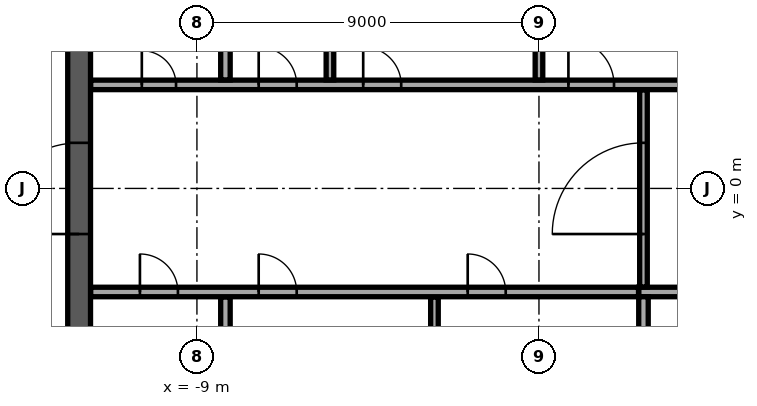
"""IFC4 building model, lengths in metres.
Left out: names, types, materials, properties, quantities, classifications, styles, units other than length and angle.
Written with IfcOpenShell. Run it as: python <this file> out.ifc"""

import sys

from ifc_helpers import new_model, si_unit, direction, frame, frame_2d, origin, place, context, subcontext, project, spatial, rectangle, extrude, element, fill, save


model = new_model("IFC4")
c1 = context("Model", 3, precision=1e-05, world=origin(), true_north=direction((0.0, 1.0)))
c2 = subcontext(c1, "Body", "Model", "MODEL_VIEW")
j1 = project(units=[si_unit("LENGTHUNIT", "METRE"), si_unit("PLANEANGLEUNIT", "RADIAN")], contexts=[c1])
p1 = place(None, origin())
s1 = spatial("IfcSite", under=j1, at=p1, CompositionType="ELEMENT")
p2 = place(p1, origin())
s2 = spatial("IfcBuilding", under=s1, at=p2, CompositionType="ELEMENT")
p3 = place(p2, frame((0.0, 0.0, 316.5)))
s3 = spatial("IfcBuildingStorey", under=s2, at=p3, CompositionType="ELEMENT", Elevation=316.5)
p4 = place(p3, frame((-12.1, -11.8, 0.0), z_axis=(0.0, 0.0, 1.0), x_axis=(0.0, 1.0, 0.0)))
e1 = element("IfcWall", 1, at=p4, inside=s3, PredefinedType="SHEAR", context=c2, shape_type="SweptSolid", body=[
    extrude(rectangle(XDim=23.6, YDim=0.6, at=frame_2d((11.8, 0.0))), origin(), (0.0, 0.0, 1.0), 3.65),
])
p5 = place(p4, frame((10.6, 0.0, 0.0)))
e2 = element("IfcOpeningElement", 2, at=p5, cuts=e1, PredefinedType="OPENING", context=c2, shape_type="SweptSolid", body=[
    extrude(rectangle(XDim=2.4, YDim=2.4, at=frame_2d((1.2, 1.2))), frame((0.0, 0.31, 0.0), z_axis=(0.0, -1.0, 0.0), x_axis=(1.0, 0.0, 0.0)), (0.0, 0.0, 1.0), 0.62),
])
p6 = place(p3, frame((2.625, -2.725, 0.0), z_axis=(0.0, 0.0, 1.0), x_axis=(1.0, 0.0, 0.0)))
e3 = element("IfcWall", 3, at=p6, inside=s3, PredefinedType="SOLIDWALL", context=c2, shape_type="SweptSolid", body=[
    extrude(rectangle(XDim=3.0, YDim=0.25, at=frame_2d((1.5, 0.0))), origin(), (0.0, 0.0, 1.0), 3.65),
])
p7 = place(p3, frame((2.75, -5.55, 0.0), z_axis=(0.0, 0.0, 1.0), x_axis=(0.0, 1.0, 0.0)))
e4 = element("IfcWall", 4, at=p7, inside=s3, PredefinedType="SOLIDWALL", context=c2, shape_type="SweptSolid", body=[
    extrude(rectangle(XDim=2.7, YDim=0.25, at=frame_2d((1.35, 0.0))), origin(), (0.0, 0.0, 1.0), 3.65),
])
p8 = place(p3, frame((-8.25, -5.545, 0.0), z_axis=(0.0, 0.0, 1.0), x_axis=(0.0, 1.0, 0.0)))
e5 = element("IfcWall", 5, at=p8, inside=s3, PredefinedType="PARTITIONING", context=c2, shape_type="SweptSolid", body=[
    extrude(rectangle(XDim=2.69, YDim=0.25, at=frame_2d((1.345, 0.0))), origin(), (0.0, 0.0, 1.0), 3.65),
])
p9 = place(p3, frame((-2.75, -5.545, 0.0), z_axis=(0.0, 0.0, 1.0), x_axis=(0.0, 1.0, 0.0)))
e6 = element("IfcWall", 6, at=p9, inside=s3, PredefinedType="PARTITIONING", context=c2, shape_type="SweptSolid", body=[
    extrude(rectangle(XDim=2.69, YDim=0.2, at=frame_2d((1.345, 0.0))), origin(), (0.0, 0.0, 1.0), 3.65),
])
p10 = place(p3, frame((-11.795, -2.725, 0.0), z_axis=(0.0, 0.0, 1.0), x_axis=(1.0, 0.0, 0.0)))
e7 = element("IfcWall", 7, at=p10, inside=s3, PredefinedType="PARTITIONING", context=c2, shape_type="SweptSolid", body=[
    extrude(rectangle(XDim=14.415, YDim=0.25, at=frame_2d((7.208, 0.0))), origin(), (0.0, 0.0, 1.0), 3.65),
])
p11 = place(p10, frame((1.295, 0.0, 0.0)))
e8 = element("IfcOpeningElement", 8, at=p11, cuts=e7, PredefinedType="OPENING", context=c2, shape_type="SweptSolid", body=[
    extrude(rectangle(XDim=1.0, YDim=2.1, at=frame_2d((0.5, 1.05))), frame((0.0, 0.135, 0.0), z_axis=(0.0, -1.0, 0.0), x_axis=(1.0, 0.0, 0.0)), (0.0, 0.0, 1.0), 0.27),
])
p12 = place(p10, frame((4.42, 0.0, 0.0)))
e9 = element("IfcOpeningElement", 9, at=p12, cuts=e7, PredefinedType="OPENING", context=c2, shape_type="SweptSolid", body=[
    extrude(rectangle(XDim=1.0, YDim=2.1, at=frame_2d((0.5, 1.05))), frame((0.0, 0.135, 0.0), z_axis=(0.0, -1.0, 0.0), x_axis=(1.0, 0.0, 0.0)), (0.0, 0.0, 1.0), 0.27),
])
p13 = place(p10, frame((9.92, 0.0, 0.0)))
e10 = element("IfcOpeningElement", 10, at=p13, cuts=e7, PredefinedType="OPENING", context=c2, shape_type="SweptSolid", body=[
    extrude(rectangle(XDim=1.0, YDim=2.1, at=frame_2d((0.5, 1.05))), frame((0.0, 0.135, 0.0), z_axis=(0.0, -1.0, 0.0), x_axis=(1.0, 0.0, 0.0)), (0.0, 0.0, 1.0), 0.27),
])
p14 = place(p3, frame((2.75, -2.595, 0.0), z_axis=(0.0, 0.0, 1.0), x_axis=(0.0, 1.0, 0.0)))
e11 = element("IfcWall", 11, at=p14, inside=s3, PredefinedType="PARTITIONING", context=c2, shape_type="SweptSolid", body=[
    extrude(rectangle(XDim=5.19, YDim=0.2, at=frame_2d((2.595, 0.0))), origin(), (0.0, 0.0, 1.0), 3.65),
])
p15 = place(p14, frame((1.395, 0.0, 0.0)))
e12 = element("IfcOpeningElement", 12, at=p15, cuts=e11, PredefinedType="OPENING", context=c2, shape_type="SweptSolid", body=[
    extrude(rectangle(XDim=2.4, YDim=2.4, at=frame_2d((1.2, 1.2))), frame((0.0, 0.11, 0.0), z_axis=(0.0, -1.0, 0.0), x_axis=(1.0, 0.0, 0.0)), (0.0, 0.0, 1.0), 0.22),
])
p16 = place(p3, frame((-11.795, 2.725, 0.0), z_axis=(0.0, 0.0, 1.0), x_axis=(1.0, 0.0, 0.0)))
e13 = element("IfcWall", 13, at=p16, inside=s3, PredefinedType="PARTITIONING", context=c2, shape_type="SweptSolid", body=[
    extrude(rectangle(XDim=23.59, YDim=0.25, at=frame_2d((11.795, 0.0))), origin(), (0.0, 0.0, 1.0), 3.65),
])
p17 = place(p16, frame((21.345, 0.0, 0.0)))
e14 = element("IfcOpeningElement", 14, at=p17, cuts=e13, PredefinedType="OPENING", context=c2, shape_type="SweptSolid", body=[
    extrude(rectangle(XDim=0.9, YDim=2.1, at=frame_2d((0.45, 1.05))), frame((0.0, 0.135, 0.0), z_axis=(0.0, -1.0, 0.0), x_axis=(1.0, 0.0, 0.0)), (0.0, 0.0, 1.0), 0.27),
])
p18 = place(p16, frame((1.345, 0.0, 0.0)))
e15 = element("IfcOpeningElement", 15, at=p18, cuts=e13, PredefinedType="OPENING", context=c2, shape_type="SweptSolid", body=[
    extrude(rectangle(XDim=0.9, YDim=2.1, at=frame_2d((0.45, 1.05))), frame((0.0, 0.135, 0.0), z_axis=(0.0, -1.0, 0.0), x_axis=(1.0, 0.0, 0.0)), (0.0, 0.0, 1.0), 0.27),
])
p19 = place(p16, frame((4.42, 0.0, 0.0)))
e16 = element("IfcOpeningElement", 16, at=p19, cuts=e13, PredefinedType="OPENING", context=c2, shape_type="SweptSolid", body=[
    extrude(rectangle(XDim=1.0, YDim=2.1, at=frame_2d((0.5, 1.05))), frame((0.0, 0.135, 0.0), z_axis=(0.0, -1.0, 0.0), x_axis=(1.0, 0.0, 0.0)), (0.0, 0.0, 1.0), 0.27),
])
p20 = place(p16, frame((7.17, 0.0, 0.0)))
e17 = element("IfcOpeningElement", 17, at=p20, cuts=e13, PredefinedType="OPENING", context=c2, shape_type="SweptSolid", body=[
    extrude(rectangle(XDim=1.0, YDim=2.1, at=frame_2d((0.5, 1.05))), frame((0.0, 0.135, 0.0), z_axis=(0.0, -1.0, 0.0), x_axis=(1.0, 0.0, 0.0)), (0.0, 0.0, 1.0), 0.27),
])
p21 = place(p16, frame((12.57, 0.0, 0.0)))
e18 = element("IfcOpeningElement", 18, at=p21, cuts=e13, PredefinedType="OPENING", context=c2, shape_type="SweptSolid", body=[
    extrude(rectangle(XDim=1.2, YDim=2.1, at=frame_2d((0.6, 1.05))), frame((0.0, 0.135, 0.0), z_axis=(0.0, -1.0, 0.0), x_axis=(1.0, 0.0, 0.0)), (0.0, 0.0, 1.0), 0.27),
])
p22 = place(p3, frame((-8.25, 2.855, 0.0), z_axis=(0.0, 0.0, 1.0), x_axis=(0.0, 1.0, 0.0)))
e19 = element("IfcWall", 19, at=p22, inside=s3, PredefinedType="PARTITIONING", context=c2, shape_type="SweptSolid", body=[
    extrude(rectangle(XDim=1.715, YDim=0.25, at=frame_2d((0.857, 0.0))), origin(), (0.0, 0.0, 1.0), 3.65),
])
for number, where, z_axis, x_axis in (
    (20, (-5.5, 2.855, 0.0), (0.0, 0.0, 1.0), (0.0, 1.0, 0.0)),
    (21, (0.0, 2.855, 0.0), (0.0, 0.0, 1.0), (0.0, 1.0, 0.0)),
):
    element("IfcWall", number, at=place(p3, frame(where, z_axis=z_axis, x_axis=x_axis)), inside=s3, PredefinedType="PARTITIONING", context=c2, shape_type="SweptSolid", body=[
        extrude(rectangle(XDim=2.69, YDim=0.2, at=frame_2d((1.345, 0.0))), origin(), (0.0, 0.0, 1.0), 3.65),
    ])
p23 = place(p5, origin())
e22 = element("IfcDoor", 22, at=p23, inside=s3, OperationType="SINGLE_SWING_LEFT", PredefinedType="DOOR", context=c2, shape_type="SweptSolid", body=[
    extrude(rectangle(XDim=2.4, YDim=2.4, at=frame_2d((1.2, 1.2))), frame((0.0, 0.025, 0.0), z_axis=(0.0, -1.0, 0.0), x_axis=(1.0, 0.0, 0.0)), (0.0, 0.0, 1.0), 0.05),
])
fill(e2, e22)
p24 = place(p11, origin())
e23 = element("IfcDoor", 23, at=p24, inside=s3, OperationType="SINGLE_SWING_RIGHT", PredefinedType="DOOR", context=c2, shape_type="SweptSolid", body=[
    extrude(rectangle(XDim=1.0, YDim=2.1, at=frame_2d((0.5, 1.05))), frame((0.0, 0.025, 0.0), z_axis=(0.0, -1.0, 0.0), x_axis=(1.0, 0.0, 0.0)), (0.0, 0.0, 1.0), 0.05),
])
fill(e8, e23)
p25 = place(p18, origin())
e24 = element("IfcDoor", 24, at=p25, inside=s3, OperationType="SINGLE_SWING_RIGHT", PredefinedType="DOOR", context=c2, shape_type="SweptSolid", body=[
    extrude(rectangle(XDim=0.9, YDim=2.1, at=frame_2d((0.45, 1.05))), frame((0.0, 0.025, 0.0), z_axis=(0.0, -1.0, 0.0), x_axis=(1.0, 0.0, 0.0)), (0.0, 0.0, 1.0), 0.05),
])
fill(e15, e24)
p26 = place(p19, origin())
e25 = element("IfcDoor", 25, at=p26, inside=s3, OperationType="SINGLE_SWING_RIGHT", PredefinedType="DOOR", context=c2, shape_type="SweptSolid", body=[
    extrude(rectangle(XDim=1.0, YDim=2.1, at=frame_2d((0.5, 1.05))), frame((0.0, 0.025, 0.0), z_axis=(0.0, -1.0, 0.0), x_axis=(1.0, 0.0, 0.0)), (0.0, 0.0, 1.0), 0.05),
])
fill(e16, e25)
p27 = place(p20, origin())
e26 = element("IfcDoor", 26, at=p27, inside=s3, OperationType="SINGLE_SWING_RIGHT", PredefinedType="DOOR", context=c2, shape_type="SweptSolid", body=[
    extrude(rectangle(XDim=1.0, YDim=2.1, at=frame_2d((0.5, 1.05))), frame((0.0, 0.025, 0.0), z_axis=(0.0, -1.0, 0.0), x_axis=(1.0, 0.0, 0.0)), (0.0, 0.0, 1.0), 0.05),
])
fill(e17, e26)
p28 = place(p21, origin())
e27 = element("IfcDoor", 27, at=p28, inside=s3, OperationType="SINGLE_SWING_LEFT", PredefinedType="DOOR", context=c2, shape_type="SweptSolid", body=[
    extrude(rectangle(XDim=1.2, YDim=2.1, at=frame_2d((0.6, 1.05))), frame((0.0, 0.025, 0.0), z_axis=(0.0, -1.0, 0.0), x_axis=(1.0, 0.0, 0.0)), (0.0, 0.0, 1.0), 0.05),
])
fill(e18, e27)
p29 = place(p12, origin())
e28 = element("IfcDoor", 28, at=p29, inside=s3, OperationType="SINGLE_SWING_RIGHT", PredefinedType="DOOR", context=c2, shape_type="SweptSolid", body=[
    extrude(rectangle(XDim=1.0, YDim=2.1, at=frame_2d((0.5, 1.05))), frame((0.0, 0.025, 0.0), z_axis=(0.0, -1.0, 0.0), x_axis=(1.0, 0.0, 0.0)), (0.0, 0.0, 1.0), 0.05),
])
fill(e9, e28)
p30 = place(p13, origin())
e29 = element("IfcDoor", 29, at=p30, inside=s3, OperationType="SINGLE_SWING_RIGHT", PredefinedType="DOOR", context=c2, shape_type="SweptSolid", body=[
    extrude(rectangle(XDim=1.0, YDim=2.1, at=frame_2d((0.5, 1.05))), frame((0.0, 0.025, 0.0), z_axis=(0.0, -1.0, 0.0), x_axis=(1.0, 0.0, 0.0)), (0.0, 0.0, 1.0), 0.05),
])
fill(e10, e29)
p31 = place(p15, origin())
e30 = element("IfcDoor", 30, at=p31, inside=s3, OperationType="DOUBLE_DOOR_DOUBLE_SWING", PredefinedType="DOOR", context=c2, shape_type="SweptSolid", body=[
    extrude(rectangle(XDim=2.4, YDim=2.4, at=frame_2d((1.2, 1.2))), frame((0.0, 0.025, 0.0), z_axis=(0.0, -1.0, 0.0), x_axis=(1.0, 0.0, 0.0)), (0.0, 0.0, 1.0), 0.05),
])
fill(e12, e30)
save(model, sys.argv[1])
